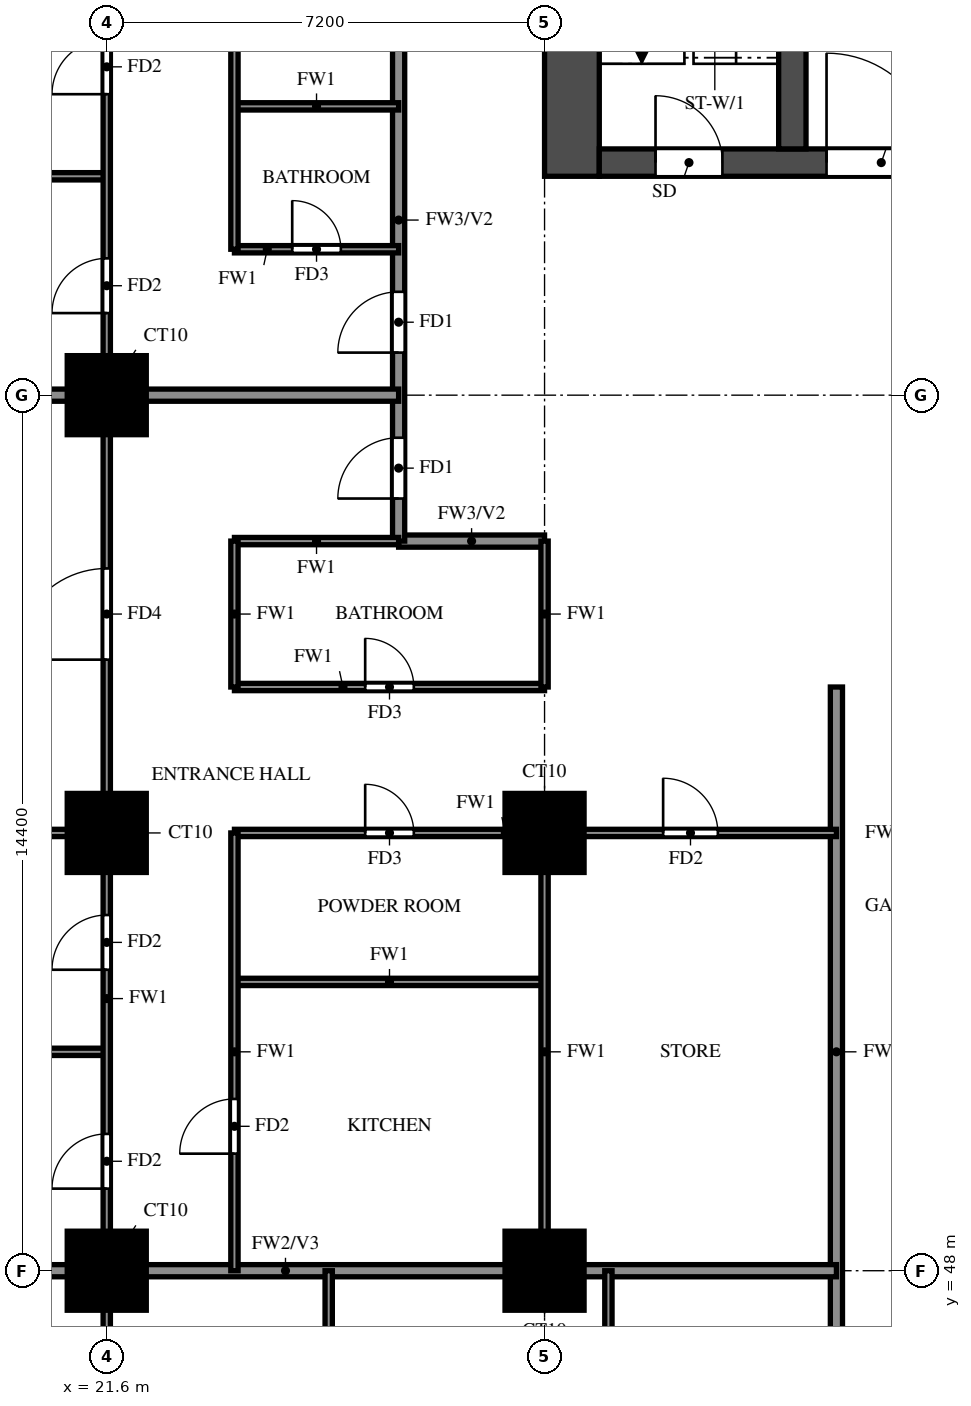
"""IFC4 building model, lengths in metres.
Left out: names, types, materials, properties, quantities, classifications, styles, units other than length and angle.
Written with IfcOpenShell. Run it as: python <this file> out.ifc"""

import sys

from ifc_helpers import new_model, si_unit, direction, frame, frame_2d, origin, origin_2d, place, context, subcontext, project, spatial, rectangle, extrude, source, transform, mapped, element, fill, save


model = new_model("IFC4")
c1 = context("Model", 3, precision=1e-05, world=origin(), true_north=direction((0.0, 1.0)))
c2 = subcontext(c1, "Body", "Model", "MODEL_VIEW")
j1 = project(units=[si_unit("LENGTHUNIT", "METRE"), si_unit("PLANEANGLEUNIT", "RADIAN")], contexts=[c1])
p1 = place(None, origin())
s1 = spatial("IfcSite", under=j1, at=p1, CompositionType="ELEMENT")
p2 = place(p1, origin())
s2 = spatial("IfcBuilding", under=s1, at=p2, CompositionType="ELEMENT")
p3 = place(p2, frame((0.0, 0.0, 65.5)))
s3 = spatial("IfcBuildingStorey", under=s2, at=p3, CompositionType="ELEMENT", Elevation=65.5)
m1 = source(origin(), c2, "Body", "SweptSolid", [
    extrude(rectangle(XDim=1.3, YDim=1.3, at=origin_2d()), origin(), (0.0, 0.0, 1.0), 3.18),
])
for number, where, z_axis, x_axis in (
    (1, (21.6, 48.0, 0.0), (0.0, 0.0, 1.0), (1.0, 0.0, 0.0)),
    (2, (28.8, 48.0, 0.0), (0.0, 0.0, 1.0), (1.0, 0.0, 0.0)),
    (3, (21.6, 55.2, 0.0), (0.0, 0.0, 1.0), (1.0, 0.0, 0.0)),
    (4, (28.8, 55.2, 0.0), (0.0, 0.0, 1.0), (1.0, 0.0, 0.0)),
    (5, (21.6, 62.4, 0.0), (0.0, 0.0, 1.0), (1.0, 0.0, 0.0)),
):
    element("IfcColumn", number, at=place(p3, frame(where, z_axis=z_axis, x_axis=x_axis)), inside=s3, PredefinedType="COLUMN", context=c2, shape_type="MappedRepresentation", body=[
        mapped(m1, transform((0.0, 0.0, 0.0))),
    ])
p4 = place(p3, frame((29.25, 66.0, 0.0), z_axis=(0.0, 0.0, 1.0), x_axis=(0.0, 1.0, 0.0)))
e6 = element("IfcWall", 6, at=p4, inside=s3, PredefinedType="SHEAR", context=c2, shape_type="SweptSolid", body=[
    extrude(rectangle(XDim=12.0, YDim=0.9, at=frame_2d((6.0, 0.0))), origin(), (0.0, 0.0, 1.0), 3.18),
])
p5 = place(p3, frame((29.7, 66.225, 0.0), z_axis=(0.0, 0.0, 1.0), x_axis=(1.0, 0.0, 0.0)))
e7 = element("IfcWall", 7, at=p5, inside=s3, PredefinedType="SHEAR", context=c2, shape_type="SweptSolid", body=[
    extrude(rectangle(XDim=41.4, YDim=0.45, at=frame_2d((20.7, 0.0))), origin(), (0.0, 0.0, 1.0), 3.18),
])
p6 = place(p5, frame((0.925, 0.0, 0.0)))
e8 = element("IfcOpeningElement", 8, at=p6, cuts=e7, PredefinedType="OPENING", context=c2, shape_type="SweptSolid", body=[
    extrude(rectangle(XDim=1.1, YDim=2.1, at=frame_2d((0.55, 1.05))), frame((0.0, 0.235, 0.0), z_axis=(0.0, -1.0, 0.0), x_axis=(1.0, 0.0, 0.0)), (0.0, 0.0, 1.0), 0.47),
])
p7 = place(p5, frame((3.738, 0.0, 0.0)))
e9 = element("IfcOpeningElement", 9, at=p7, cuts=e7, PredefinedType="OPENING", context=c2, shape_type="SweptSolid", body=[
    extrude(rectangle(XDim=1.8, YDim=2.1, at=frame_2d((0.9, 1.05))), frame((0.0, 0.235, 0.0), z_axis=(0.0, -1.0, 0.0), x_axis=(1.0, 0.0, 0.0)), (0.0, 0.0, 1.0), 0.47),
])
p8 = place(p3, frame((32.875, 66.45, 0.0), z_axis=(0.0, 0.0, 1.0), x_axis=(0.0, 1.0, 0.0)))
e10 = element("IfcWall", 10, at=p8, inside=s3, PredefinedType="SHEAR", context=c2, shape_type="SweptSolid", body=[
    extrude(rectangle(XDim=10.65, YDim=0.45, at=frame_2d((5.325, 0.0))), origin(), (0.0, 0.0, 1.0), 3.18),
])
p9 = place(p3, frame((26.4, 60.0, 0.0), z_axis=(0.0, 0.0, 1.0), x_axis=(1.0, 0.0, 0.0)))
e11 = element("IfcWall", 11, at=p9, inside=s3, PredefinedType="SOLIDWALL", context=c2, shape_type="SweptSolid", body=[
    extrude(rectangle(XDim=2.4, YDim=0.2, at=frame_2d((1.2, 0.0))), origin(), (0.0, 0.0, 1.0), 3.18),
])
p10 = place(p3, frame((26.4, 60.0, 0.0), z_axis=(0.0, 0.0, 1.0), x_axis=(0.0, 1.0, 0.0)))
e12 = element("IfcWall", 12, at=p10, inside=s3, PredefinedType="SOLIDWALL", context=c2, shape_type="SweptSolid", body=[
    extrude(rectangle(XDim=9.6, YDim=0.2, at=frame_2d((4.8, 0.0))), origin(), (0.0, 0.0, 1.0), 3.18),
])
p11 = place(p10, frame((0.7, 0.0, 0.0)))
e13 = element("IfcOpeningElement", 13, at=p11, cuts=e12, PredefinedType="OPENING", context=c2, shape_type="SweptSolid", body=[
    extrude(rectangle(XDim=1.0, YDim=2.1, at=frame_2d((0.5, 1.05))), frame((0.0, 0.11, 0.0), z_axis=(0.0, -1.0, 0.0), x_axis=(1.0, 0.0, 0.0)), (0.0, 0.0, 1.0), 0.22),
])
p12 = place(p10, frame((3.1, 0.0, 0.0)))
e14 = element("IfcOpeningElement", 14, at=p12, cuts=e12, PredefinedType="OPENING", context=c2, shape_type="SweptSolid", body=[
    extrude(rectangle(XDim=1.0, YDim=2.1, at=frame_2d((0.5, 1.05))), frame((0.0, 0.11, 0.0), z_axis=(0.0, -1.0, 0.0), x_axis=(1.0, 0.0, 0.0)), (0.0, 0.0, 1.0), 0.22),
])
p13 = place(p3, frame((33.6, 45.6, 0.0), z_axis=(0.0, 0.0, 1.0), x_axis=(0.0, 1.0, 0.0)))
e15 = element("IfcWall", 15, at=p13, inside=s3, PredefinedType="SOLIDWALL", context=c2, shape_type="SweptSolid", body=[
    extrude(rectangle(XDim=12.0, YDim=0.2, at=frame_2d((6.0, 0.0))), origin(), (0.0, 0.0, 1.0), 3.18),
])
p14 = place(p3, frame((14.525, 48.0, 0.0), z_axis=(0.0, 0.0, 1.0), x_axis=(1.0, 0.0, 0.0)))
e16 = element("IfcWall", 16, at=p14, inside=s3, PredefinedType="SOLIDWALL", context=c2, shape_type="SweptSolid", body=[
    extrude(rectangle(XDim=19.075, YDim=0.2, at=frame_2d((9.538, 0.0))), origin(), (0.0, 0.0, 1.0), 3.18),
])
p15 = place(p3, frame((14.525, 62.4, 0.0), z_axis=(0.0, 0.0, 1.0), x_axis=(1.0, 0.0, 0.0)))
e17 = element("IfcWall", 17, at=p15, inside=s3, PredefinedType="SOLIDWALL", context=c2, shape_type="SweptSolid", body=[
    extrude(rectangle(XDim=11.875, YDim=0.2, at=frame_2d((5.938, 0.0))), origin(), (0.0, 0.0, 1.0), 3.18),
])
p16 = place(p3, frame((14.525, 51.6, 0.0), z_axis=(0.0, 0.0, 1.0), x_axis=(1.0, 0.0, 0.0)))
e18 = element("IfcWall", 18, at=p16, inside=s3, PredefinedType="PARTITIONING", context=c2, shape_type="SweptSolid", body=[
    extrude(rectangle(XDim=7.075, YDim=0.12, at=frame_2d((3.538, 0.0))), origin(), (0.0, 0.0, 1.0), 2.28),
])
p17 = place(p3, frame((23.7, 52.75, 0.0), z_axis=(0.0, 0.0, 1.0), x_axis=(1.0, 0.0, 0.0)))
e19 = element("IfcWall", 19, at=p17, inside=s3, PredefinedType="PARTITIONING", context=c2, shape_type="SweptSolid", body=[
    extrude(rectangle(XDim=5.1, YDim=0.12, at=frame_2d((2.55, 0.0))), origin(), (0.0, 0.0, 1.0), 3.18),
])
p18 = place(p3, frame((14.525, 55.2, 0.0), z_axis=(0.0, 0.0, 1.0), x_axis=(1.0, 0.0, 0.0)))
e20 = element("IfcWall", 20, at=p18, inside=s3, PredefinedType="PARTITIONING", context=c2, shape_type="SweptSolid", body=[
    extrude(rectangle(XDim=7.075, YDim=0.12, at=frame_2d((3.538, 0.0))), origin(), (0.0, 0.0, 1.0), 3.18),
])
p19 = place(p3, frame((23.7, 55.2, 0.0), z_axis=(0.0, 0.0, 1.0), x_axis=(1.0, 0.0, 0.0)))
e21 = element("IfcWall", 21, at=p19, inside=s3, PredefinedType="PARTITIONING", context=c2, shape_type="SweptSolid", body=[
    extrude(rectangle(XDim=9.9, YDim=0.12, at=frame_2d((4.95, 0.0))), origin(), (0.0, 0.0, 1.0), 3.18),
])
p20 = place(p19, frame((2.15, 0.0, 0.0)))
e22 = element("IfcOpeningElement", 22, at=p20, cuts=e21, PredefinedType="OPENING", context=c2, shape_type="SweptSolid", body=[
    extrude(rectangle(XDim=0.8, YDim=2.1, at=frame_2d((0.4, 1.05))), frame((0.0, 0.07, 0.0), z_axis=(0.0, -1.0, 0.0), x_axis=(1.0, 0.0, 0.0)), (0.0, 0.0, 1.0), 0.14),
])
p21 = place(p19, frame((7.05, 0.0, 0.0)))
e23 = element("IfcOpeningElement", 23, at=p21, cuts=e21, PredefinedType="OPENING", context=c2, shape_type="SweptSolid", body=[
    extrude(rectangle(XDim=0.9, YDim=2.1, at=frame_2d((0.45, 1.05))), frame((0.0, 0.07, 0.0), z_axis=(0.0, -1.0, 0.0), x_axis=(1.0, 0.0, 0.0)), (0.0, 0.0, 1.0), 0.14),
])
p22 = place(p3, frame((23.7, 57.6, 0.0), z_axis=(0.0, 0.0, 1.0), x_axis=(1.0, 0.0, 0.0)))
e24 = element("IfcWall", 24, at=p22, inside=s3, PredefinedType="PARTITIONING", context=c2, shape_type="SweptSolid", body=[
    extrude(rectangle(XDim=5.1, YDim=0.12, at=frame_2d((2.55, 0.0))), origin(), (0.0, 0.0, 1.0), 3.18),
])
p23 = place(p22, frame((2.15, 0.0, 0.0)))
e25 = element("IfcOpeningElement", 25, at=p23, cuts=e24, PredefinedType="OPENING", context=c2, shape_type="SweptSolid", body=[
    extrude(rectangle(XDim=0.8, YDim=2.1, at=frame_2d((0.4, 1.05))), frame((0.0, 0.07, 0.0), z_axis=(0.0, -1.0, 0.0), x_axis=(1.0, 0.0, 0.0)), (0.0, 0.0, 1.0), 0.14),
])
p24 = place(p3, frame((23.7, 60.0, 0.0), z_axis=(0.0, 0.0, 1.0), x_axis=(1.0, 0.0, 0.0)))
e26 = element("IfcWall", 26, at=p24, inside=s3, PredefinedType="PARTITIONING", context=c2, shape_type="SweptSolid", body=[
    extrude(rectangle(XDim=2.7, YDim=0.12, at=frame_2d((1.35, 0.0))), origin(), (0.0, 0.0, 1.0), 3.18),
])
p25 = place(p3, frame((23.7, 64.8, 0.0), z_axis=(0.0, 0.0, 1.0), x_axis=(1.0, 0.0, 0.0)))
e27 = element("IfcWall", 27, at=p25, inside=s3, PredefinedType="PARTITIONING", context=c2, shape_type="SweptSolid", body=[
    extrude(rectangle(XDim=2.7, YDim=0.12, at=frame_2d((1.35, 0.0))), origin(), (0.0, 0.0, 1.0), 3.18),
])
p26 = place(p25, frame((0.95, 0.0, 0.0)))
e28 = element("IfcOpeningElement", 28, at=p26, cuts=e27, PredefinedType="OPENING", context=c2, shape_type="SweptSolid", body=[
    extrude(rectangle(XDim=0.8, YDim=2.1, at=frame_2d((0.4, 1.05))), frame((0.0, 0.07, 0.0), z_axis=(0.0, -1.0, 0.0), x_axis=(1.0, 0.0, 0.0)), (0.0, 0.0, 1.0), 0.14),
])
p27 = place(p3, frame((14.525, 66.0, 0.0), z_axis=(0.0, 0.0, 1.0), x_axis=(1.0, 0.0, 0.0)))
e29 = element("IfcWall", 29, at=p27, inside=s3, PredefinedType="PARTITIONING", context=c2, shape_type="SweptSolid", body=[
    extrude(rectangle(XDim=7.075, YDim=0.12, at=frame_2d((3.538, 0.0))), origin(), (0.0, 0.0, 1.0), 2.28),
])
p28 = place(p3, frame((23.7, 67.15, 0.0), z_axis=(0.0, 0.0, 1.0), x_axis=(1.0, 0.0, 0.0)))
e30 = element("IfcWall", 30, at=p28, inside=s3, PredefinedType="PARTITIONING", context=c2, shape_type="SweptSolid", body=[
    extrude(rectangle(XDim=2.7, YDim=0.12, at=frame_2d((1.35, 0.0))), origin(), (0.0, 0.0, 1.0), 3.18),
])
p29 = place(p3, frame((21.6, 33.725, 0.0), z_axis=(0.0, 0.0, 1.0), x_axis=(0.0, 1.0, 0.0)))
e31 = element("IfcWall", 31, at=p29, inside=s3, PredefinedType="PARTITIONING", context=c2, shape_type="SweptSolid", body=[
    extrude(rectangle(XDim=39.475, YDim=0.12, at=frame_2d((19.737, 0.0))), origin(), (0.0, 0.0, 1.0), 3.18),
])
p30 = place(p29, frame((7.775, 0.0, 0.0)))
e32 = element("IfcOpeningElement", 32, at=p30, cuts=e31, PredefinedType="OPENING", context=c2, shape_type="SweptSolid", body=[
    extrude(rectangle(XDim=0.9, YDim=2.1, at=frame_2d((0.45, 1.05))), frame((0.0, 0.07, 0.0), z_axis=(0.0, -1.0, 0.0), x_axis=(1.0, 0.0, 0.0)), (0.0, 0.0, 1.0), 0.14),
])
p31 = place(p29, frame((15.625, 0.0, 0.0)))
e33 = element("IfcOpeningElement", 33, at=p31, cuts=e31, PredefinedType="OPENING", context=c2, shape_type="SweptSolid", body=[
    extrude(rectangle(XDim=0.9, YDim=2.1, at=frame_2d((0.45, 1.05))), frame((0.0, 0.07, 0.0), z_axis=(0.0, -1.0, 0.0), x_axis=(1.0, 0.0, 0.0)), (0.0, 0.0, 1.0), 0.14),
])
p32 = place(p29, frame((19.225, 0.0, 0.0)))
e34 = element("IfcOpeningElement", 34, at=p32, cuts=e31, PredefinedType="OPENING", context=c2, shape_type="SweptSolid", body=[
    extrude(rectangle(XDim=0.9, YDim=2.1, at=frame_2d((0.45, 1.05))), frame((0.0, 0.07, 0.0), z_axis=(0.0, -1.0, 0.0), x_axis=(1.0, 0.0, 0.0)), (0.0, 0.0, 1.0), 0.14),
])
p33 = place(p29, frame((24.325, 0.0, 0.0)))
e35 = element("IfcOpeningElement", 35, at=p33, cuts=e31, PredefinedType="OPENING", context=c2, shape_type="SweptSolid", body=[
    extrude(rectangle(XDim=1.5, YDim=2.1, at=frame_2d((0.75, 1.05))), frame((0.0, 0.07, 0.0), z_axis=(0.0, -1.0, 0.0), x_axis=(1.0, 0.0, 0.0)), (0.0, 0.0, 1.0), 0.14),
])
p34 = place(p29, frame((30.025, 0.0, 0.0)))
e36 = element("IfcOpeningElement", 36, at=p34, cuts=e31, PredefinedType="OPENING", context=c2, shape_type="SweptSolid", body=[
    extrude(rectangle(XDim=0.9, YDim=2.1, at=frame_2d((0.45, 1.05))), frame((0.0, 0.07, 0.0), z_axis=(0.0, -1.0, 0.0), x_axis=(1.0, 0.0, 0.0)), (0.0, 0.0, 1.0), 0.14),
])
p35 = place(p29, frame((33.625, 0.0, 0.0)))
e37 = element("IfcOpeningElement", 37, at=p35, cuts=e31, PredefinedType="OPENING", context=c2, shape_type="SweptSolid", body=[
    extrude(rectangle(XDim=0.9, YDim=2.1, at=frame_2d((0.45, 1.05))), frame((0.0, 0.07, 0.0), z_axis=(0.0, -1.0, 0.0), x_axis=(1.0, 0.0, 0.0)), (0.0, 0.0, 1.0), 0.14),
])
p36 = place(p29, frame((37.225, 0.0, 0.0)))
e38 = element("IfcOpeningElement", 38, at=p36, cuts=e31, PredefinedType="OPENING", context=c2, shape_type="SweptSolid", body=[
    extrude(rectangle(XDim=0.9, YDim=2.1, at=frame_2d((0.45, 1.05))), frame((0.0, 0.07, 0.0), z_axis=(0.0, -1.0, 0.0), x_axis=(1.0, 0.0, 0.0)), (0.0, 0.0, 1.0), 0.14),
])
p37 = place(p3, frame((23.7, 48.0, 0.0), z_axis=(0.0, 0.0, 1.0), x_axis=(0.0, 1.0, 0.0)))
e39 = element("IfcWall", 39, at=p37, inside=s3, PredefinedType="PARTITIONING", context=c2, shape_type="SweptSolid", body=[
    extrude(rectangle(XDim=7.2, YDim=0.12, at=frame_2d((3.6, 0.0))), origin(), (0.0, 0.0, 1.0), 3.18),
])
p38 = place(p37, frame((1.925, 0.0, 0.0)))
e40 = element("IfcOpeningElement", 40, at=p38, cuts=e39, PredefinedType="OPENING", context=c2, shape_type="SweptSolid", body=[
    extrude(rectangle(XDim=0.9, YDim=2.1, at=frame_2d((0.45, 1.05))), frame((0.0, 0.07, 0.0), z_axis=(0.0, -1.0, 0.0), x_axis=(1.0, 0.0, 0.0)), (0.0, 0.0, 1.0), 0.14),
])
p39 = place(p3, frame((23.7, 57.6, 0.0), z_axis=(0.0, 0.0, 1.0), x_axis=(0.0, 1.0, 0.0)))
e41 = element("IfcWall", 41, at=p39, inside=s3, PredefinedType="PARTITIONING", context=c2, shape_type="SweptSolid", body=[
    extrude(rectangle(XDim=2.4, YDim=0.12, at=frame_2d((1.2, 0.0))), origin(), (0.0, 0.0, 1.0), 3.18),
])
p40 = place(p3, frame((23.7, 64.8, 0.0), z_axis=(0.0, 0.0, 1.0), x_axis=(0.0, 1.0, 0.0)))
e42 = element("IfcWall", 42, at=p40, inside=s3, PredefinedType="PARTITIONING", context=c2, shape_type="SweptSolid", body=[
    extrude(rectangle(XDim=8.4, YDim=0.12, at=frame_2d((4.2, 0.0))), origin(), (0.0, 0.0, 1.0), 3.18),
])
p41 = place(p40, frame((4.925, 0.0, 0.0)))
e43 = element("IfcOpeningElement", 43, at=p41, cuts=e42, PredefinedType="OPENING", context=c2, shape_type="SweptSolid", body=[
    extrude(rectangle(XDim=0.9, YDim=2.1, at=frame_2d((0.45, 1.05))), frame((0.0, 0.07, 0.0), z_axis=(0.0, -1.0, 0.0), x_axis=(1.0, 0.0, 0.0)), (0.0, 0.0, 1.0), 0.14),
])
p42 = place(p3, frame((25.25, 42.9, 0.0), z_axis=(0.0, 0.0, 1.0), x_axis=(0.0, 1.0, 0.0)))
e44 = element("IfcWall", 44, at=p42, inside=s3, PredefinedType="PARTITIONING", context=c2, shape_type="SweptSolid", body=[
    extrude(rectangle(XDim=5.1, YDim=0.12, at=frame_2d((2.55, 0.0))), origin(), (0.0, 0.0, 1.0), 3.18),
])
p43 = place(p3, frame((28.8, 48.0, 0.0), z_axis=(0.0, 0.0, 1.0), x_axis=(0.0, 1.0, 0.0)))
e45 = element("IfcWall", 45, at=p43, inside=s3, PredefinedType="PARTITIONING", context=c2, shape_type="SweptSolid", body=[
    extrude(rectangle(XDim=7.2, YDim=0.12, at=frame_2d((3.6, 0.0))), origin(), (0.0, 0.0, 1.0), 3.18),
])
p44 = place(p3, frame((28.8, 57.6, 0.0), z_axis=(0.0, 0.0, 1.0), x_axis=(0.0, 1.0, 0.0)))
e46 = element("IfcWall", 46, at=p44, inside=s3, PredefinedType="PARTITIONING", context=c2, shape_type="SweptSolid", body=[
    extrude(rectangle(XDim=2.4, YDim=0.12, at=frame_2d((1.2, 0.0))), origin(), (0.0, 0.0, 1.0), 3.18),
])
p45 = place(p3, frame((29.85, 42.9, 0.0), z_axis=(0.0, 0.0, 1.0), x_axis=(0.0, 1.0, 0.0)))
e47 = element("IfcWall", 47, at=p45, inside=s3, PredefinedType="PARTITIONING", context=c2, shape_type="SweptSolid", body=[
    extrude(rectangle(XDim=5.1, YDim=0.12, at=frame_2d((2.55, 0.0))), origin(), (0.0, 0.0, 1.0), 3.18),
])
p46 = place(p6, origin())
e48 = element("IfcDoor", 48, at=p46, inside=s3, OperationType="SINGLE_SWING_LEFT", PredefinedType="DOOR", context=c2, shape_type="SweptSolid", body=[
    extrude(rectangle(XDim=1.1, YDim=2.1, at=frame_2d((0.55, 1.05))), frame((0.0, 0.025, 0.0), z_axis=(0.0, -1.0, 0.0), x_axis=(1.0, 0.0, 0.0)), (0.0, 0.0, 1.0), 0.05),
])
fill(e8, e48)
p47 = place(p7, origin())
e49 = element("IfcDoor", 49, at=p47, inside=s3, OperationType="DOUBLE_DOOR_SINGLE_SWING", PredefinedType="DOOR", context=c2, shape_type="SweptSolid", body=[
    extrude(rectangle(XDim=1.8, YDim=2.1, at=frame_2d((0.9, 1.05))), frame((0.0, 0.025, 0.0), z_axis=(0.0, -1.0, 0.0), x_axis=(1.0, 0.0, 0.0)), (0.0, 0.0, 1.0), 0.05),
])
fill(e9, e49)
p48 = place(p11, origin())
e50 = element("IfcDoor", 50, at=p48, inside=s3, OperationType="SINGLE_SWING_RIGHT", PredefinedType="DOOR", context=c2, shape_type="SweptSolid", body=[
    extrude(rectangle(XDim=1.0, YDim=2.1, at=frame_2d((0.5, 1.05))), frame((0.0, 0.025, 0.0), z_axis=(0.0, -1.0, 0.0), x_axis=(1.0, 0.0, 0.0)), (0.0, 0.0, 1.0), 0.05),
])
fill(e13, e50)
p49 = place(p31, origin())
e51 = element("IfcDoor", 51, at=p49, inside=s3, OperationType="SINGLE_SWING_LEFT", PredefinedType="DOOR", context=c2, shape_type="SweptSolid", body=[
    extrude(rectangle(XDim=0.9, YDim=2.1, at=frame_2d((0.45, 1.05))), frame((0.0, 0.025, 0.0), z_axis=(0.0, -1.0, 0.0), x_axis=(1.0, 0.0, 0.0)), (0.0, 0.0, 1.0), 0.05),
])
fill(e33, e51)
p50 = place(p32, origin())
e52 = element("IfcDoor", 52, at=p50, inside=s3, OperationType="SINGLE_SWING_LEFT", PredefinedType="DOOR", context=c2, shape_type="SweptSolid", body=[
    extrude(rectangle(XDim=0.9, YDim=2.1, at=frame_2d((0.45, 1.05))), frame((0.0, 0.025, 0.0), z_axis=(0.0, -1.0, 0.0), x_axis=(1.0, 0.0, 0.0)), (0.0, 0.0, 1.0), 0.05),
])
fill(e34, e52)
p51 = place(p33, origin())
e53 = element("IfcDoor", 53, at=p51, inside=s3, OperationType="SINGLE_SWING_RIGHT", PredefinedType="DOOR", context=c2, shape_type="SweptSolid", body=[
    extrude(rectangle(XDim=1.5, YDim=2.1, at=frame_2d((0.75, 1.05))), frame((0.0, 0.025, 0.0), z_axis=(0.0, -1.0, 0.0), x_axis=(1.0, 0.0, 0.0)), (0.0, 0.0, 1.0), 0.05),
])
fill(e35, e53)
p52 = place(p38, origin())
e54 = element("IfcDoor", 54, at=p52, inside=s3, OperationType="SINGLE_SWING_LEFT", PredefinedType="DOOR", context=c2, shape_type="SweptSolid", body=[
    extrude(rectangle(XDim=0.9, YDim=2.1, at=frame_2d((0.45, 1.05))), frame((0.0, 0.025, 0.0), z_axis=(0.0, -1.0, 0.0), x_axis=(1.0, 0.0, 0.0)), (0.0, 0.0, 1.0), 0.05),
])
fill(e40, e54)
p53 = place(p20, origin())
e55 = element("IfcDoor", 55, at=p53, inside=s3, OperationType="SINGLE_SWING_LEFT", PredefinedType="DOOR", context=c2, shape_type="SweptSolid", body=[
    extrude(rectangle(XDim=0.8, YDim=2.1, at=frame_2d((0.4, 1.05))), frame((0.0, 0.025, 0.0), z_axis=(0.0, -1.0, 0.0), x_axis=(1.0, 0.0, 0.0)), (0.0, 0.0, 1.0), 0.05),
])
fill(e22, e55)
p54 = place(p23, origin())
e56 = element("IfcDoor", 56, at=p54, inside=s3, OperationType="SINGLE_SWING_RIGHT", PredefinedType="DOOR", context=c2, shape_type="SweptSolid", body=[
    extrude(rectangle(XDim=0.8, YDim=2.1, at=frame_2d((0.4, 1.05))), frame((0.0, 0.025, 0.0), z_axis=(0.0, -1.0, 0.0), x_axis=(1.0, 0.0, 0.0)), (0.0, 0.0, 1.0), 0.05),
])
fill(e25, e56)
p55 = place(p21, origin())
e57 = element("IfcDoor", 57, at=p55, inside=s3, OperationType="SINGLE_SWING_LEFT", PredefinedType="DOOR", context=c2, shape_type="SweptSolid", body=[
    extrude(rectangle(XDim=0.9, YDim=2.1, at=frame_2d((0.45, 1.05))), frame((0.0, 0.025, 0.0), z_axis=(0.0, -1.0, 0.0), x_axis=(1.0, 0.0, 0.0)), (0.0, 0.0, 1.0), 0.05),
])
fill(e23, e57)
p56 = place(p12, origin())
e58 = element("IfcDoor", 58, at=p56, inside=s3, OperationType="SINGLE_SWING_RIGHT", PredefinedType="DOOR", context=c2, shape_type="SweptSolid", body=[
    extrude(rectangle(XDim=1.0, YDim=2.1, at=frame_2d((0.5, 1.05))), frame((0.0, 0.025, 0.0), z_axis=(0.0, -1.0, 0.0), x_axis=(1.0, 0.0, 0.0)), (0.0, 0.0, 1.0), 0.05),
])
fill(e14, e58)
p57 = place(p34, origin())
e59 = element("IfcDoor", 59, at=p57, inside=s3, OperationType="SINGLE_SWING_LEFT", PredefinedType="DOOR", context=c2, shape_type="SweptSolid", body=[
    extrude(rectangle(XDim=0.9, YDim=2.1, at=frame_2d((0.45, 1.05))), frame((0.0, 0.025, 0.0), z_axis=(0.0, -1.0, 0.0), x_axis=(1.0, 0.0, 0.0)), (0.0, 0.0, 1.0), 0.05),
])
fill(e36, e59)
p58 = place(p35, origin())
e60 = element("IfcDoor", 60, at=p58, inside=s3, OperationType="SINGLE_SWING_LEFT", PredefinedType="DOOR", context=c2, shape_type="SweptSolid", body=[
    extrude(rectangle(XDim=0.9, YDim=2.1, at=frame_2d((0.45, 1.05))), frame((0.0, 0.025, 0.0), z_axis=(0.0, -1.0, 0.0), x_axis=(1.0, 0.0, 0.0)), (0.0, 0.0, 1.0), 0.05),
])
fill(e37, e60)
p59 = place(p26, origin())
e61 = element("IfcDoor", 61, at=p59, inside=s3, OperationType="SINGLE_SWING_LEFT", PredefinedType="DOOR", context=c2, shape_type="SweptSolid", body=[
    extrude(rectangle(XDim=0.8, YDim=2.1, at=frame_2d((0.4, 1.05))), frame((0.0, 0.025, 0.0), z_axis=(0.0, -1.0, 0.0), x_axis=(1.0, 0.0, 0.0)), (0.0, 0.0, 1.0), 0.05),
])
fill(e28, e61)
save(model, sys.argv[1])
